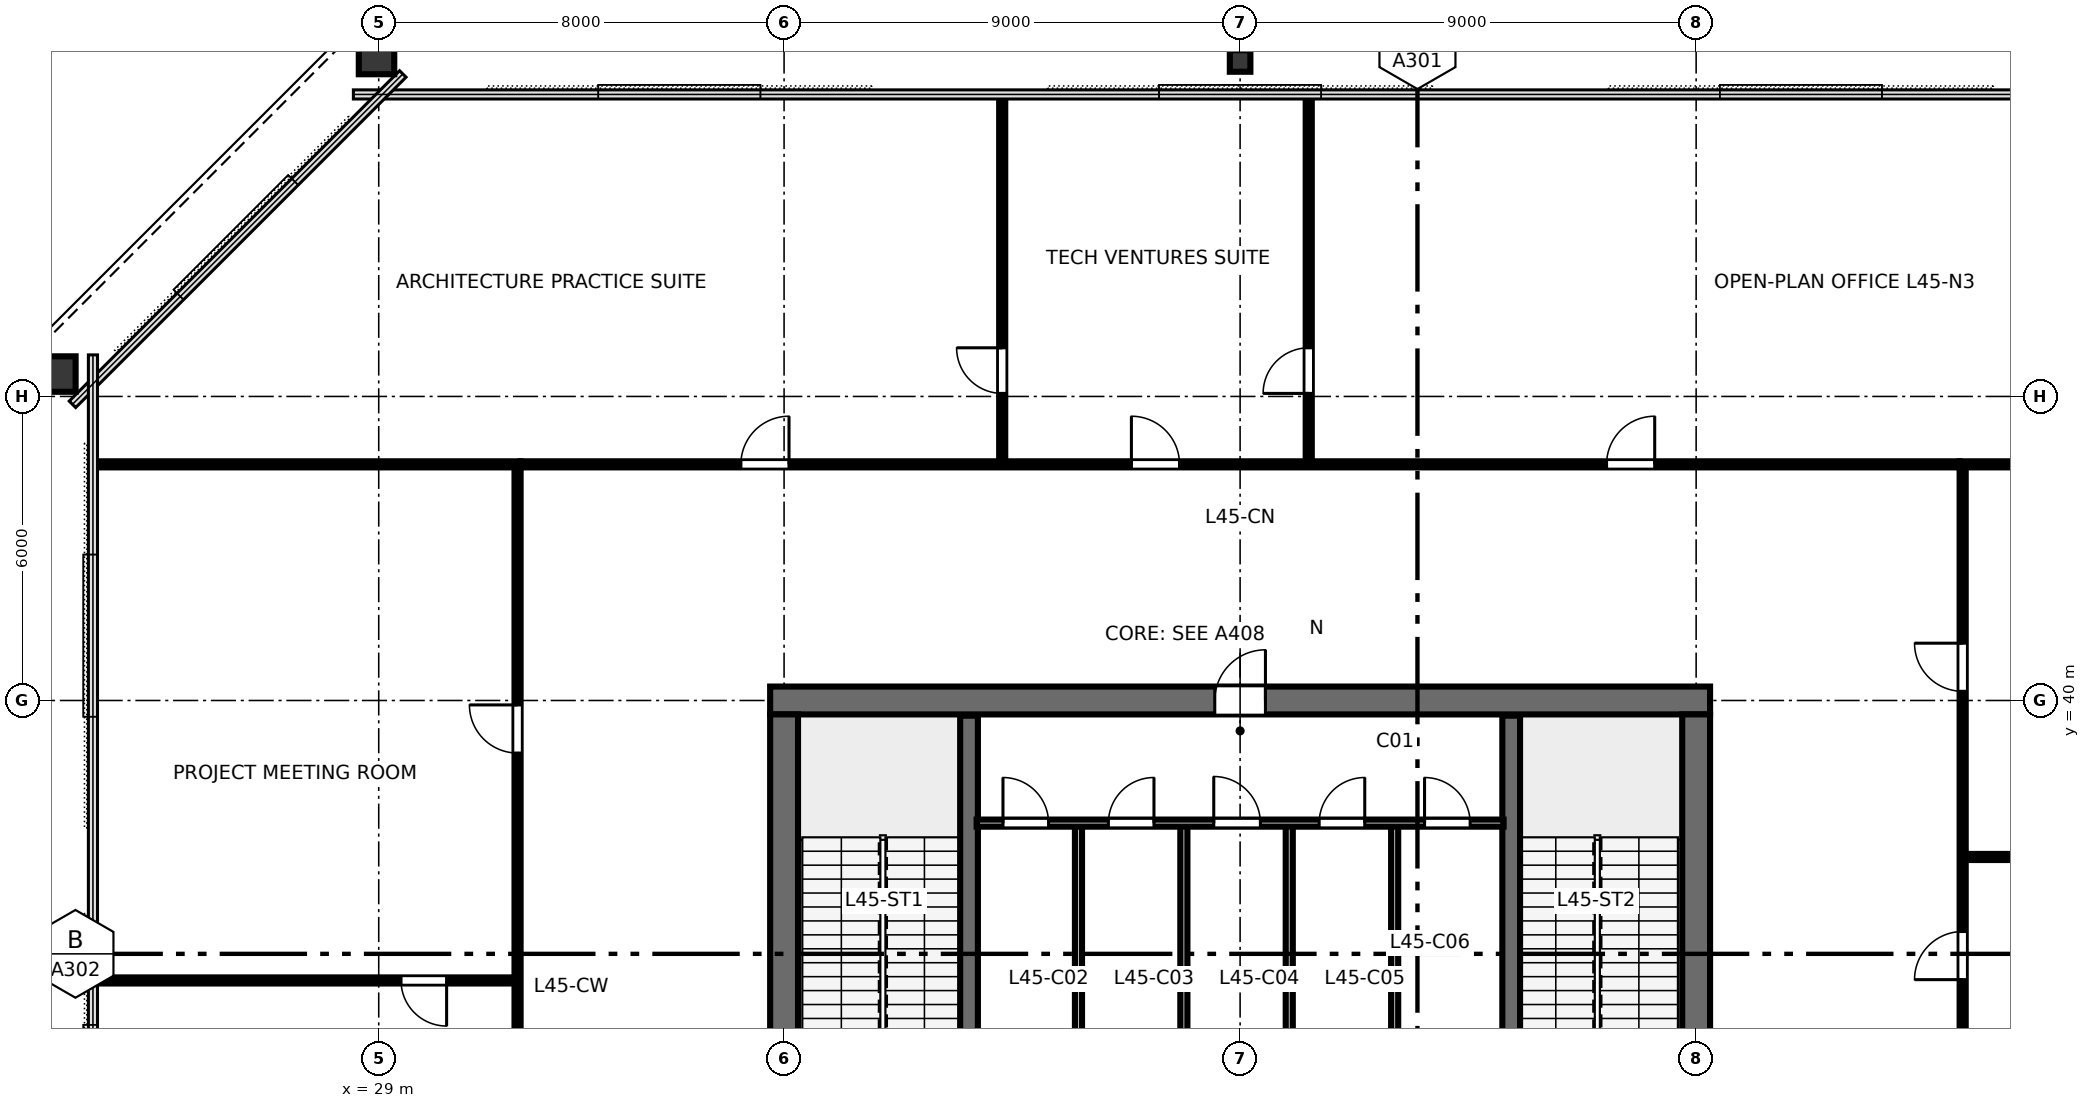
"""IFC4 building model, lengths in metres.
Left out: names, types, materials, properties, quantities, classifications, styles, units other than length and angle.
Written with IfcOpenShell. Run it as: python <this file> out.ifc"""

import sys

from ifc_helpers import new_model, si_unit, direction, frame, frame_2d, origin, origin_2d, place, context, subcontext, project, spatial, rectangle, hollow_rectangle, i_section, extrude, element, fill, save


model = new_model("IFC4")
c1 = context("Model", 3, precision=1e-05, world=origin(), true_north=direction((0.0, 1.0)))
c2 = subcontext(c1, "Body", "Model", "MODEL_VIEW")
j1 = project(units=[si_unit("LENGTHUNIT", "METRE"), si_unit("PLANEANGLEUNIT", "RADIAN")], contexts=[c1])
p1 = place(None, origin())
s1 = spatial("IfcSite", under=j1, at=p1, CompositionType="ELEMENT")
p2 = place(p1, origin())
s2 = spatial("IfcBuilding", under=s1, at=p2, CompositionType="ELEMENT")
p3 = place(p2, frame((0.0, 0.0, 172.0)))
s3 = spatial("IfcBuildingStorey", under=s2, at=p3, CompositionType="ELEMENT", Elevation=172.0)
p4 = place(p3, frame((36.725, 40.0, 0.0), z_axis=(0.0, 0.0, 1.0), x_axis=(1.0, 0.0, 0.0)))
e1 = element("IfcWall", 1, at=p4, inside=s3, PredefinedType="SHEAR", context=c2, shape_type="SweptSolid", body=[
    extrude(rectangle(XDim=18.55, YDim=0.55, at=frame_2d((9.275, 0.0))), origin(), (0.0, 0.0, 1.0), 4.76),
])
p5 = place(p4, frame((8.775, 0.0, 0.0)))
e2 = element("IfcOpeningElement", 2, at=p5, cuts=e1, PredefinedType="OPENING", context=c2, shape_type="SweptSolid", body=[
    extrude(rectangle(XDim=1.0, YDim=2.15, at=frame_2d((0.5, 1.075))), frame((0.0, 0.285, 0.0), z_axis=(0.0, -1.0, 0.0), x_axis=(1.0, 0.0, 0.0)), (0.0, 0.0, 1.0), 0.57),
])
p6 = place(p3, frame((37.0, 24.275, 0.0), z_axis=(0.0, 0.0, 1.0), x_axis=(0.0, 1.0, 0.0)))
e3 = element("IfcWall", 3, at=p6, inside=s3, PredefinedType="SHEAR", context=c2, shape_type="SweptSolid", body=[
    extrude(rectangle(XDim=15.45, YDim=0.55, at=frame_2d((7.725, 0.0))), origin(), (0.0, 0.0, 1.0), 4.76),
])
p7 = place(p6, frame((5.25, 0.0, 0.0)))
e4 = element("IfcOpeningElement", 4, at=p7, cuts=e3, PredefinedType="OPENING", context=c2, shape_type="SweptSolid", body=[
    extrude(rectangle(XDim=1.15, YDim=2.15, at=frame_2d((0.575, 1.075))), frame((0.0, 0.285, 0.0), z_axis=(0.0, -1.0, 0.0), x_axis=(1.0, 0.0, 0.0)), (0.0, 0.0, 1.0), 0.57),
])
p8 = place(p3, frame((55.0, 24.275, 0.0), z_axis=(0.0, 0.0, 1.0), x_axis=(0.0, 1.0, 0.0)))
e5 = element("IfcWall", 5, at=p8, inside=s3, PredefinedType="SHEAR", context=c2, shape_type="SweptSolid", body=[
    extrude(rectangle(XDim=15.45, YDim=0.55, at=frame_2d((7.725, 0.0))), origin(), (0.0, 0.0, 1.0), 4.76),
])
p9 = place(p8, frame((5.25, 0.0, 0.0)))
e6 = element("IfcOpeningElement", 6, at=p9, cuts=e5, PredefinedType="OPENING", context=c2, shape_type="SweptSolid", body=[
    extrude(rectangle(XDim=1.15, YDim=2.15, at=frame_2d((0.575, 1.075))), frame((0.0, 0.285, 0.0), z_axis=(0.0, -1.0, 0.0), x_axis=(1.0, 0.0, 0.0)), (0.0, 0.0, 1.0), 0.57),
])
p10 = place(p3, frame((46.0, 52.62, 0.0), z_axis=(0.0, -0.046233027607, 0.998930681858), x_axis=(1.0, 0.0, 0.0)))
e7 = element("IfcColumn", 7, at=p10, inside=s3, PredefinedType="COLUMN", context=c2, shape_type="SweptSolid", body=[
    extrude(i_section(OverallWidth=0.406, OverallDepth=0.425, WebThickness=0.033, FlangeThickness=0.052, FilletRadius=0.025, at=origin_2d()), origin(), (0.0, 0.0, 1.0), 4.763),
])
p11 = place(p3, frame((28.957, 52.783, 0.0), z_axis=(0.062460790535, -0.046397982813, 0.996968342946), x_axis=(0.596311896623, 0.802752839886, 0.0)))
e8 = element("IfcColumn", 8, at=p11, inside=s3, PredefinedType="COLUMN", context=c2, shape_type="SweptSolid", body=[
    extrude(hollow_rectangle(XDim=0.7, YDim=0.85, WallThickness=0.04, at=origin_2d()), origin(), (0.0, 0.0, 1.0), 4.772),
])
p12 = place(p3, frame((22.593, 46.442, 0.0), z_axis=(0.054739996676, -0.054074931296, 0.997035322629), x_axis=(-0.709306139229, 0.700688401089, 0.076945210577)))
e9 = element("IfcColumn", 9, at=p12, inside=s3, PredefinedType="COLUMN", context=c2, shape_type="SweptSolid", body=[
    extrude(hollow_rectangle(XDim=0.7, YDim=0.85, WallThickness=0.04, at=origin_2d()), origin(), (0.0, 0.0, 1.0), 4.772),
])
for number, where, z_axis, x_axis in (
    (10, (40.65, 32.0, 0.0), (0.0, 0.0, 1.0), (0.0, 1.0, 0.0)),
    (11, (51.35, 32.0, 0.0), (0.0, 0.0, 1.0), (0.0, 1.0, 0.0)),
):
    element("IfcWall", number, at=place(p3, frame(where, z_axis=z_axis, x_axis=x_axis)), inside=s3, PredefinedType="SHEAR", context=c2, shape_type="SweptSolid", body=[
        extrude(rectangle(XDim=7.7, YDim=0.35, at=frame_2d((3.85, 0.0))), origin(), (0.0, 0.0, 1.0), 5.0),
    ])
for number, where, z_axis, x_axis in (
    (12, (42.81, 32.05, 0.0), (0.0, 0.0, 1.0), (0.0, 1.0, 0.0)),
    (13, (44.89, 32.05, 0.0), (0.0, 0.0, 1.0), (0.0, 1.0, 0.0)),
    (14, (46.97, 32.05, 0.0), (0.0, 0.0, 1.0), (0.0, 1.0, 0.0)),
    (15, (49.05, 32.05, 0.0), (0.0, 0.0, 1.0), (0.0, 1.0, 0.0)),
):
    element("IfcWall", number, at=place(p3, frame(where, z_axis=z_axis, x_axis=x_axis)), inside=s3, PredefinedType="PARTITIONING", context=c2, shape_type="SweptSolid", body=[
        extrude(rectangle(XDim=5.5, YDim=0.14, at=frame_2d((2.75, 0.0))), origin(), (0.0, 0.0, 1.0), 4.76),
    ])
p13 = place(p3, frame((40.8, 37.58, 0.0), z_axis=(0.0, 0.0, 1.0), x_axis=(1.0, 0.0, 0.0)))
e16 = element("IfcWall", 16, at=p13, inside=s3, PredefinedType="PARTITIONING", context=c2, shape_type="SweptSolid", body=[
    extrude(rectangle(XDim=10.4, YDim=0.14, at=frame_2d((5.2, 0.0))), origin(), (0.0, 0.0, 1.0), 4.76),
])
p14 = place(p13, frame((0.52, 0.0, 0.0)))
e17 = element("IfcOpeningElement", 17, at=p14, cuts=e16, PredefinedType="OPENING", context=c2, shape_type="SweptSolid", body=[
    extrude(rectangle(XDim=0.9, YDim=2.15, at=frame_2d((0.45, 1.075))), frame((0.0, 0.08, 0.0), z_axis=(0.0, -1.0, 0.0), x_axis=(1.0, 0.0, 0.0)), (0.0, 0.0, 1.0), 0.16),
])
p15 = place(p13, frame((2.6, 0.0, 0.0)))
e18 = element("IfcOpeningElement", 18, at=p15, cuts=e16, PredefinedType="OPENING", context=c2, shape_type="SweptSolid", body=[
    extrude(rectangle(XDim=0.9, YDim=2.15, at=frame_2d((0.45, 1.075))), frame((0.0, 0.08, 0.0), z_axis=(0.0, -1.0, 0.0), x_axis=(1.0, 0.0, 0.0)), (0.0, 0.0, 1.0), 0.16),
])
p16 = place(p13, frame((4.68, 0.0, 0.0)))
e19 = element("IfcOpeningElement", 19, at=p16, cuts=e16, PredefinedType="OPENING", context=c2, shape_type="SweptSolid", body=[
    extrude(rectangle(XDim=0.92, YDim=2.15, at=frame_2d((0.46, 1.075))), frame((0.0, 0.08, 0.0), z_axis=(0.0, -1.0, 0.0), x_axis=(1.0, 0.0, 0.0)), (0.0, 0.0, 1.0), 0.16),
])
p17 = place(p13, frame((6.76, 0.0, 0.0)))
e20 = element("IfcOpeningElement", 20, at=p17, cuts=e16, PredefinedType="OPENING", context=c2, shape_type="SweptSolid", body=[
    extrude(rectangle(XDim=0.9, YDim=2.15, at=frame_2d((0.45, 1.075))), frame((0.0, 0.08, 0.0), z_axis=(0.0, -1.0, 0.0), x_axis=(1.0, 0.0, 0.0)), (0.0, 0.0, 1.0), 0.16),
])
p18 = place(p13, frame((8.84, 0.0, 0.0)))
e21 = element("IfcOpeningElement", 21, at=p18, cuts=e16, PredefinedType="OPENING", context=c2, shape_type="SweptSolid", body=[
    extrude(rectangle(XDim=0.9, YDim=2.15, at=frame_2d((0.45, 1.075))), frame((0.0, 0.08, 0.0), z_axis=(0.0, -1.0, 0.0), x_axis=(1.0, 0.0, 0.0)), (0.0, 0.0, 1.0), 0.16),
])
p19 = place(p3, frame((41.305, 44.66, 0.0), z_axis=(0.0, 0.0, 1.0), x_axis=(0.0, 1.0, 0.0)))
e22 = element("IfcWall", 22, at=p19, inside=s3, PredefinedType="PARTITIONING", context=c2, shape_type="SweptSolid", body=[
    extrude(rectangle(XDim=7.3, YDim=0.12, at=frame_2d((3.65, 0.0))), origin(), (0.0, 0.0, 1.0), 4.04),
])
p20 = place(p19, frame((1.4, 0.0, 0.0)))
e23 = element("IfcOpeningElement", 23, at=p20, cuts=e22, PredefinedType="OPENING", context=c2, shape_type="SweptSolid", body=[
    extrude(rectangle(XDim=0.9, YDim=2.15, at=frame_2d((0.45, 1.075))), frame((0.0, 0.07, 0.0), z_axis=(0.0, -1.0, 0.0), x_axis=(1.0, 0.0, 0.0)), (0.0, 0.0, 1.0), 0.14),
])
p21 = place(p3, frame((47.354, 44.66, 0.0), z_axis=(0.0, 0.0, 1.0), x_axis=(0.0, 1.0, 0.0)))
e24 = element("IfcWall", 24, at=p21, inside=s3, PredefinedType="PARTITIONING", context=c2, shape_type="SweptSolid", body=[
    extrude(rectangle(XDim=7.3, YDim=0.12, at=frame_2d((3.65, 0.0))), origin(), (0.0, 0.0, 1.0), 4.04),
])
p22 = place(p21, frame((1.4, 0.0, 0.0)))
e25 = element("IfcOpeningElement", 25, at=p22, cuts=e24, PredefinedType="OPENING", context=c2, shape_type="SweptSolid", body=[
    extrude(rectangle(XDim=0.9, YDim=2.15, at=frame_2d((0.45, 1.075))), frame((0.0, 0.07, 0.0), z_axis=(0.0, -1.0, 0.0), x_axis=(1.0, 0.0, 0.0)), (0.0, 0.0, 1.0), 0.14),
])
p23 = place(p3, frame((31.8, 44.66, 0.0), z_axis=(0.0, 0.0, 1.0), x_axis=(1.0, 0.0, 0.0)))
e26 = element("IfcWall", 26, at=p23, inside=s3, PredefinedType="PARTITIONING", context=c2, shape_type="SweptSolid", body=[
    extrude(rectangle(XDim=28.4, YDim=0.12, at=frame_2d((14.2, 0.0))), origin(), (0.0, 0.0, 1.0), 4.04),
])
p24 = place(p23, frame((4.347, 0.0, 0.0)))
e27 = element("IfcOpeningElement", 27, at=p24, cuts=e26, PredefinedType="OPENING", context=c2, shape_type="SweptSolid", body=[
    extrude(rectangle(XDim=0.95, YDim=2.15, at=frame_2d((0.475, 1.075))), frame((0.0, 0.07, 0.0), z_axis=(0.0, -1.0, 0.0), x_axis=(1.0, 0.0, 0.0)), (0.0, 0.0, 1.0), 0.14),
])
p25 = place(p23, frame((12.055, 0.0, 0.0)))
e28 = element("IfcOpeningElement", 28, at=p25, cuts=e26, PredefinedType="OPENING", context=c2, shape_type="SweptSolid", body=[
    extrude(rectangle(XDim=0.95, YDim=2.15, at=frame_2d((0.475, 1.075))), frame((0.0, 0.07, 0.0), z_axis=(0.0, -1.0, 0.0), x_axis=(1.0, 0.0, 0.0)), (0.0, 0.0, 1.0), 0.14),
])
p26 = place(p23, frame((21.432, 0.0, 0.0)))
e29 = element("IfcOpeningElement", 29, at=p26, cuts=e26, PredefinedType="OPENING", context=c2, shape_type="SweptSolid", body=[
    extrude(rectangle(XDim=0.95, YDim=2.15, at=frame_2d((0.475, 1.075))), frame((0.0, 0.07, 0.0), z_axis=(0.0, -1.0, 0.0), x_axis=(1.0, 0.0, 0.0)), (0.0, 0.0, 1.0), 0.14),
])
p27 = place(p3, frame((31.74, 34.475, 0.0), z_axis=(0.0, 0.0, 1.0), x_axis=(-1.0, 0.0, 0.0)))
e30 = element("IfcWall", 30, at=p27, inside=s3, PredefinedType="PARTITIONING", context=c2, shape_type="SweptSolid", body=[
    extrude(rectangle(XDim=8.38, YDim=0.12, at=frame_2d((4.19, 0.0))), origin(), (0.0, 0.0, 1.0), 4.04),
])
p28 = place(p27, frame((1.4, 0.0, 0.0)))
e31 = element("IfcOpeningElement", 31, at=p28, cuts=e30, PredefinedType="OPENING", context=c2, shape_type="SweptSolid", body=[
    extrude(rectangle(XDim=0.9, YDim=2.15, at=frame_2d((0.45, 1.075))), frame((0.0, 0.07, 0.0), z_axis=(0.0, -1.0, 0.0), x_axis=(1.0, 0.0, 0.0)), (0.0, 0.0, 1.0), 0.14),
])
p29 = place(p3, frame((31.74, 33.02, 0.0), z_axis=(0.0, 0.0, 1.0), x_axis=(0.0, 1.0, 0.0)))
e32 = element("IfcWall", 32, at=p29, inside=s3, PredefinedType="PARTITIONING", context=c2, shape_type="SweptSolid", body=[
    extrude(rectangle(XDim=11.58, YDim=0.12, at=frame_2d((5.79, 0.0))), origin(), (0.0, 0.0, 1.0), 4.04),
])
p30 = place(p29, frame((5.943, 0.0, 0.0)))
e33 = element("IfcOpeningElement", 33, at=p30, cuts=e32, PredefinedType="OPENING", context=c2, shape_type="SweptSolid", body=[
    extrude(rectangle(XDim=0.95, YDim=2.15, at=frame_2d((0.475, 1.075))), frame((0.0, 0.07, 0.0), z_axis=(0.0, -1.0, 0.0), x_axis=(1.0, 0.0, 0.0)), (0.0, 0.0, 1.0), 0.14),
])
p31 = place(p3, frame((60.26, 36.912, 0.0), z_axis=(0.0, 0.0, 1.0), x_axis=(1.0, 0.0, 0.0)))
e34 = element("IfcWall", 34, at=p31, inside=s3, PredefinedType="PARTITIONING", context=c2, shape_type="SweptSolid", body=[
    extrude(rectangle(XDim=8.38, YDim=0.12, at=frame_2d((4.19, 0.0))), origin(), (0.0, 0.0, 1.0), 4.04),
])
p32 = place(p31, frame((1.4, 0.0, 0.0)))
e35 = element("IfcOpeningElement", 35, at=p32, cuts=e34, PredefinedType="OPENING", context=c2, shape_type="SweptSolid", body=[
    extrude(rectangle(XDim=0.9, YDim=2.15, at=frame_2d((0.45, 1.075))), frame((0.0, 0.07, 0.0), z_axis=(0.0, -1.0, 0.0), x_axis=(1.0, 0.0, 0.0)), (0.0, 0.0, 1.0), 0.14),
])
p33 = place(p3, frame((60.26, 33.02, 0.0), z_axis=(0.0, 0.0, 1.0), x_axis=(0.0, 1.0, 0.0)))
e36 = element("IfcWall", 36, at=p33, inside=s3, PredefinedType="PARTITIONING", context=c2, shape_type="SweptSolid", body=[
    extrude(rectangle(XDim=11.58, YDim=0.12, at=frame_2d((5.79, 0.0))), origin(), (0.0, 0.0, 1.0), 4.04),
])
p34 = place(p33, frame((1.471, 0.0, 0.0)))
e37 = element("IfcOpeningElement", 37, at=p34, cuts=e36, PredefinedType="OPENING", context=c2, shape_type="SweptSolid", body=[
    extrude(rectangle(XDim=0.95, YDim=2.15, at=frame_2d((0.475, 1.075))), frame((0.0, 0.07, 0.0), z_axis=(0.0, -1.0, 0.0), x_axis=(1.0, 0.0, 0.0)), (0.0, 0.0, 1.0), 0.14),
])
p35 = place(p33, frame((7.161, 0.0, 0.0)))
e38 = element("IfcOpeningElement", 38, at=p35, cuts=e36, PredefinedType="OPENING", context=c2, shape_type="SweptSolid", body=[
    extrude(rectangle(XDim=0.95, YDim=2.15, at=frame_2d((0.475, 1.075))), frame((0.0, 0.07, 0.0), z_axis=(0.0, -1.0, 0.0), x_axis=(1.0, 0.0, 0.0)), (0.0, 0.0, 1.0), 0.14),
])
for number, where, z_axis, x_axis in (
    (39, (31.8, 44.66, 0.0), (0.0, 0.0, 1.0), (-1.0, 0.0, 0.0)),
    (40, (60.2, 44.66, 0.0), (0.0, 0.0, 1.0), (1.0, 0.0, 0.0)),
):
    element("IfcWall", number, at=place(p3, frame(where, z_axis=z_axis, x_axis=x_axis)), inside=s3, PredefinedType="PARTITIONING", context=c2, shape_type="SweptSolid", body=[
        extrude(rectangle(XDim=8.44, YDim=0.12, at=frame_2d((4.22, 0.0))), origin(), (0.0, 0.0, 1.0), 4.04),
    ])
p36 = place(p5, origin())
e41 = element("IfcDoor", 41, at=p36, inside=s3, OperationType="SINGLE_SWING_RIGHT", PredefinedType="DOOR", context=c2, shape_type="SweptSolid", body=[
    extrude(rectangle(XDim=1.0, YDim=2.15, at=frame_2d((0.5, 1.075))), frame((0.0, 0.025, 0.0), z_axis=(0.0, -1.0, 0.0), x_axis=(1.0, 0.0, 0.0)), (0.0, 0.0, 1.0), 0.05),
])
fill(e2, e41)
p37 = place(p14, origin())
e42 = element("IfcDoor", 42, at=p37, inside=s3, OperationType="SINGLE_SWING_LEFT", PredefinedType="DOOR", context=c2, shape_type="SweptSolid", body=[
    extrude(rectangle(XDim=0.9, YDim=2.15, at=frame_2d((0.45, 1.075))), frame((0.0, 0.025, 0.0), z_axis=(0.0, -1.0, 0.0), x_axis=(1.0, 0.0, 0.0)), (0.0, 0.0, 1.0), 0.05),
])
fill(e17, e42)
p38 = place(p15, origin())
e43 = element("IfcDoor", 43, at=p38, inside=s3, OperationType="SINGLE_SWING_RIGHT", PredefinedType="DOOR", context=c2, shape_type="SweptSolid", body=[
    extrude(rectangle(XDim=0.9, YDim=2.15, at=frame_2d((0.45, 1.075))), frame((0.0, 0.025, 0.0), z_axis=(0.0, -1.0, 0.0), x_axis=(1.0, 0.0, 0.0)), (0.0, 0.0, 1.0), 0.05),
])
fill(e18, e43)
p39 = place(p16, origin())
e44 = element("IfcDoor", 44, at=p39, inside=s3, OperationType="SINGLE_SWING_LEFT", PredefinedType="DOOR", context=c2, shape_type="SweptSolid", body=[
    extrude(rectangle(XDim=0.92, YDim=2.15, at=frame_2d((0.46, 1.075))), frame((0.0, 0.025, 0.0), z_axis=(0.0, -1.0, 0.0), x_axis=(1.0, 0.0, 0.0)), (0.0, 0.0, 1.0), 0.05),
])
fill(e19, e44)
p40 = place(p17, origin())
e45 = element("IfcDoor", 45, at=p40, inside=s3, OperationType="SINGLE_SWING_RIGHT", PredefinedType="DOOR", context=c2, shape_type="SweptSolid", body=[
    extrude(rectangle(XDim=0.9, YDim=2.15, at=frame_2d((0.45, 1.075))), frame((0.0, 0.025, 0.0), z_axis=(0.0, -1.0, 0.0), x_axis=(1.0, 0.0, 0.0)), (0.0, 0.0, 1.0), 0.05),
])
fill(e20, e45)
p41 = place(p18, origin())
e46 = element("IfcDoor", 46, at=p41, inside=s3, OperationType="SINGLE_SWING_LEFT", PredefinedType="DOOR", context=c2, shape_type="SweptSolid", body=[
    extrude(rectangle(XDim=0.9, YDim=2.15, at=frame_2d((0.45, 1.075))), frame((0.0, 0.025, 0.0), z_axis=(0.0, -1.0, 0.0), x_axis=(1.0, 0.0, 0.0)), (0.0, 0.0, 1.0), 0.05),
])
fill(e21, e46)
p42 = place(p20, origin())
e47 = element("IfcDoor", 47, at=p42, inside=s3, OperationType="SINGLE_SWING_RIGHT", PredefinedType="DOOR", context=c2, shape_type="SweptSolid", body=[
    extrude(rectangle(XDim=0.9, YDim=2.15, at=frame_2d((0.45, 1.075))), frame((0.0, 0.025, 0.0), z_axis=(0.0, -1.0, 0.0), x_axis=(1.0, 0.0, 0.0)), (0.0, 0.0, 1.0), 0.05),
])
fill(e23, e47)
p43 = place(p22, origin())
e48 = element("IfcDoor", 48, at=p43, inside=s3, OperationType="SINGLE_SWING_LEFT", PredefinedType="DOOR", context=c2, shape_type="SweptSolid", body=[
    extrude(rectangle(XDim=0.9, YDim=2.15, at=frame_2d((0.45, 1.075))), frame((0.0, 0.025, 0.0), z_axis=(0.0, -1.0, 0.0), x_axis=(1.0, 0.0, 0.0)), (0.0, 0.0, 1.0), 0.05),
])
fill(e25, e48)
p44 = place(p24, origin())
e49 = element("IfcDoor", 49, at=p44, inside=s3, OperationType="SINGLE_SWING_RIGHT", PredefinedType="DOOR", context=c2, shape_type="SweptSolid", body=[
    extrude(rectangle(XDim=0.95, YDim=2.15, at=frame_2d((0.475, 1.075))), frame((0.0, 0.025, 0.0), z_axis=(0.0, -1.0, 0.0), x_axis=(1.0, 0.0, 0.0)), (0.0, 0.0, 1.0), 0.05),
])
fill(e27, e49)
p45 = place(p25, origin())
e50 = element("IfcDoor", 50, at=p45, inside=s3, OperationType="SINGLE_SWING_LEFT", PredefinedType="DOOR", context=c2, shape_type="SweptSolid", body=[
    extrude(rectangle(XDim=0.95, YDim=2.15, at=frame_2d((0.475, 1.075))), frame((0.0, 0.025, 0.0), z_axis=(0.0, -1.0, 0.0), x_axis=(1.0, 0.0, 0.0)), (0.0, 0.0, 1.0), 0.05),
])
fill(e28, e50)
p46 = place(p26, origin())
e51 = element("IfcDoor", 51, at=p46, inside=s3, OperationType="SINGLE_SWING_RIGHT", PredefinedType="DOOR", context=c2, shape_type="SweptSolid", body=[
    extrude(rectangle(XDim=0.95, YDim=2.15, at=frame_2d((0.475, 1.075))), frame((0.0, 0.025, 0.0), z_axis=(0.0, -1.0, 0.0), x_axis=(1.0, 0.0, 0.0)), (0.0, 0.0, 1.0), 0.05),
])
fill(e29, e51)
p47 = place(p28, origin())
e52 = element("IfcDoor", 52, at=p47, inside=s3, OperationType="SINGLE_SWING_LEFT", PredefinedType="DOOR", context=c2, shape_type="SweptSolid", body=[
    extrude(rectangle(XDim=0.9, YDim=2.15, at=frame_2d((0.45, 1.075))), frame((0.0, 0.025, 0.0), z_axis=(0.0, -1.0, 0.0), x_axis=(1.0, 0.0, 0.0)), (0.0, 0.0, 1.0), 0.05),
])
fill(e31, e52)
p48 = place(p30, origin())
e53 = element("IfcDoor", 53, at=p48, inside=s3, OperationType="SINGLE_SWING_RIGHT", PredefinedType="DOOR", context=c2, shape_type="SweptSolid", body=[
    extrude(rectangle(XDim=0.95, YDim=2.15, at=frame_2d((0.475, 1.075))), frame((0.0, 0.025, 0.0), z_axis=(0.0, -1.0, 0.0), x_axis=(1.0, 0.0, 0.0)), (0.0, 0.0, 1.0), 0.05),
])
fill(e33, e53)
p49 = place(p34, origin())
e54 = element("IfcDoor", 54, at=p49, inside=s3, OperationType="SINGLE_SWING_LEFT", PredefinedType="DOOR", context=c2, shape_type="SweptSolid", body=[
    extrude(rectangle(XDim=0.95, YDim=2.15, at=frame_2d((0.475, 1.075))), frame((0.0, 0.025, 0.0), z_axis=(0.0, -1.0, 0.0), x_axis=(1.0, 0.0, 0.0)), (0.0, 0.0, 1.0), 0.05),
])
fill(e37, e54)
p50 = place(p35, origin())
e55 = element("IfcDoor", 55, at=p50, inside=s3, OperationType="SINGLE_SWING_RIGHT", PredefinedType="DOOR", context=c2, shape_type="SweptSolid", body=[
    extrude(rectangle(XDim=0.95, YDim=2.15, at=frame_2d((0.475, 1.075))), frame((0.0, 0.025, 0.0), z_axis=(0.0, -1.0, 0.0), x_axis=(1.0, 0.0, 0.0)), (0.0, 0.0, 1.0), 0.05),
])
fill(e38, e55)
save(model, sys.argv[1])
